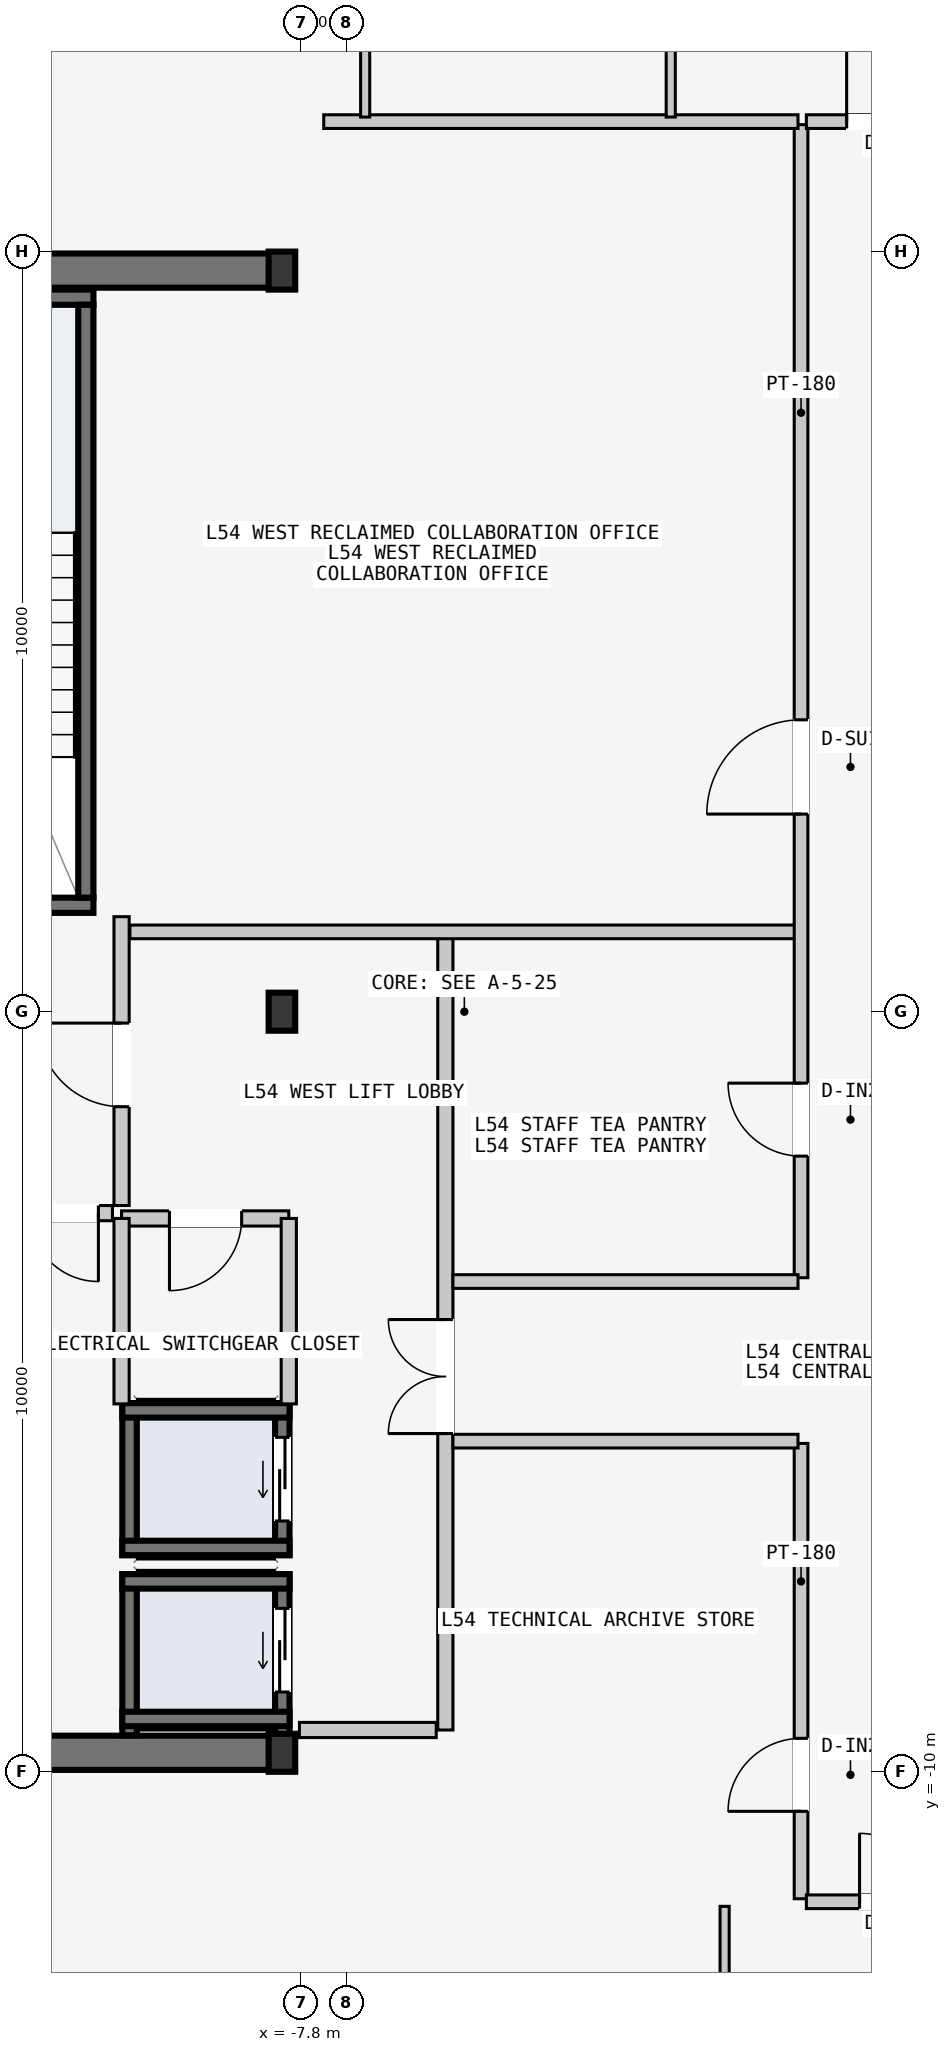
"""IFC4 building model, lengths in metres.
Left out: names, types, materials, properties, quantities, classifications, styles, units other than length and angle.
Written with IfcOpenShell. Run it as: python <this file> out.ifc"""

import sys

from ifc_helpers import new_model, si_unit, direction, frame, frame_2d, origin, origin_2d, place, context, subcontext, project, spatial, rectangle, i_section, extrude, element, fill, save


model = new_model("IFC4")
c1 = context("Model", 3, precision=1e-05, world=origin(), true_north=direction((0.0, 1.0)))
c2 = subcontext(c1, "Body", "Model", "MODEL_VIEW")
j1 = project(units=[si_unit("LENGTHUNIT", "METRE"), si_unit("PLANEANGLEUNIT", "RADIAN")], contexts=[c1])
p1 = place(None, origin())
s1 = spatial("IfcSite", under=j1, at=p1, CompositionType="ELEMENT")
p2 = place(p1, origin())
s2 = spatial("IfcBuilding", under=s1, at=p2, CompositionType="ELEMENT")
p3 = place(p2, frame((0.0, 0.0, 205.5)))
s3 = spatial("IfcBuildingStorey", under=s2, at=p3, CompositionType="ELEMENT", Elevation=205.5)
for number, where, z_axis, x_axis in (
    (1, (-14.53, -9.75, -0.2), (0.0, 0.0, 1.0), (1.0, 0.0, 0.0)),
    (2, (-14.53, 9.75, -0.2), (0.0, 0.0, 1.0), (1.0, 0.0, 0.0)),
):
    element("IfcWall", number, at=place(p3, frame(where, z_axis=z_axis, x_axis=x_axis)), inside=s3, PredefinedType="SHEAR", context=c2, shape_type="SweptSolid", body=[
        extrude(rectangle(XDim=6.46, YDim=0.45, at=frame_2d((3.23, 0.0))), origin(), (0.0, 0.0, 1.0), 3.6),
    ])
p4 = place(p3, frame((-14.25, 1.4, -0.2), z_axis=(0.0, 0.0, 1.0), x_axis=(1.0, 0.0, 0.0)))
e3 = element("IfcWall", 3, at=p4, inside=s3, PredefinedType="SOLIDWALL", context=c2, shape_type="SweptSolid", body=[
    extrude(rectangle(XDim=3.72, YDim=0.2, at=frame_2d((1.86, 0.0))), origin(), (0.0, 0.0, 1.0), 3.6),
])
p5 = place(p4, frame((1.5, 0.0, 0.2)))
e4 = element("IfcOpeningElement", 4, at=p5, cuts=e3, PredefinedType="OPENING", context=c2, shape_type="SweptSolid", body=[
    extrude(rectangle(XDim=1.12, YDim=2.18, at=frame_2d((0.56, 1.09))), frame((0.0, 0.11, 0.0), z_axis=(0.0, -1.0, 0.0), x_axis=(1.0, 0.0, 0.0)), (0.0, 0.0, 1.0), 0.22),
])
p6 = place(p3, frame((-14.25, 9.4, -0.2), z_axis=(0.0, 0.0, 1.0), x_axis=(1.0, 0.0, 0.0)))
e5 = element("IfcWall", 5, at=p6, inside=s3, PredefinedType="SOLIDWALL", context=c2, shape_type="SweptSolid", body=[
    extrude(rectangle(XDim=3.72, YDim=0.2, at=frame_2d((1.86, 0.0))), origin(), (0.0, 0.0, 1.0), 3.6),
])
p7 = place(p3, frame((-10.63, 1.5, -0.2), z_axis=(0.0, 0.0, 1.0), x_axis=(0.0, 1.0, 0.0)))
e6 = element("IfcWall", 6, at=p7, inside=s3, PredefinedType="SOLIDWALL", context=c2, shape_type="SweptSolid", body=[
    extrude(rectangle(XDim=7.8, YDim=0.2, at=frame_2d((3.9, 0.0))), origin(), (0.0, 0.0, 1.0), 3.6),
])
for number, where, z_axis, x_axis in (
    (7, (-8.05, -9.75, 0.0), (0.0, 0.0, 1.0), (1.0, 0.0, 0.0)),
    (8, (-8.05, 0.0, 0.0), (0.0, 0.0, 1.0), (1.0, 0.0, 0.0)),
    (9, (-8.05, 9.75, 0.0), (0.0, 0.0, 1.0), (1.0, 0.0, 0.0)),
):
    element("IfcColumn", number, at=place(p3, frame(where, z_axis=z_axis, x_axis=x_axis)), inside=s3, PredefinedType="COLUMN", context=c2, shape_type="SweptSolid", body=[
        extrude(i_section(OverallWidth=0.35, OverallDepth=0.5, WebThickness=0.02, FlangeThickness=0.032, at=origin_2d()), origin(), (0.0, 0.0, 1.0), 3.6),
    ])
p8 = place(p3, frame((-8.045, -9.52, -0.2), z_axis=(0.0, 0.0, 1.0), x_axis=(0.0, 1.0, 0.0)))
e10 = element("IfcWall", 10, at=p8, inside=s3, PredefinedType="SOLIDWALL", context=c2, shape_type="SweptSolid", body=[
    extrude(rectangle(XDim=2.12, YDim=0.19, at=frame_2d((1.06, 0.0))), origin(), (0.0, 0.0, 1.0), 3.6),
])
p9 = place(p8, frame((0.57, 0.0, 0.2)))
e11 = element("IfcOpeningElement", 11, at=p9, cuts=e10, PredefinedType="OPENING", context=c2, shape_type="SweptSolid", body=[
    extrude(rectangle(XDim=1.1, YDim=2.2, at=frame_2d((0.55, 1.1))), frame((0.0, 0.105, 0.0), z_axis=(0.0, -1.0, 0.0), x_axis=(1.0, 0.0, 0.0)), (0.0, 0.0, 1.0), 0.21),
])
p10 = place(p3, frame((-10.055, -9.52, -0.2), z_axis=(0.0, 0.0, 1.0), x_axis=(0.0, 1.0, 0.0)))
e12 = element("IfcWall", 12, at=p10, inside=s3, PredefinedType="SOLIDWALL", context=c2, shape_type="SweptSolid", body=[
    extrude(rectangle(XDim=2.12, YDim=0.19, at=frame_2d((1.06, 0.0))), origin(), (0.0, 0.0, 1.0), 3.6),
])
for number, where, z_axis, x_axis in (
    (13, (-10.15, -7.495, -0.2), (0.0, 0.0, 1.0), (1.0, 0.0, 0.0)),
    (14, (-10.15, -9.305, -0.2), (0.0, 0.0, 1.0), (1.0, 0.0, 0.0)),
):
    element("IfcWall", number, at=place(p3, frame(where, z_axis=z_axis, x_axis=x_axis)), inside=s3, PredefinedType="SOLIDWALL", context=c2, shape_type="SweptSolid", body=[
        extrude(rectangle(XDim=2.2, YDim=0.19, at=frame_2d((1.1, 0.0))), origin(), (0.0, 0.0, 1.0), 3.6),
    ])
p11 = place(p3, frame((-8.045, -7.15, -0.2), z_axis=(0.0, 0.0, 1.0), x_axis=(0.0, 1.0, 0.0)))
e15 = element("IfcWall", 15, at=p11, inside=s3, PredefinedType="SOLIDWALL", context=c2, shape_type="SweptSolid", body=[
    extrude(rectangle(XDim=2.0, YDim=0.19, at=frame_2d((1.0, 0.0))), origin(), (0.0, 0.0, 1.0), 3.6),
])
p12 = place(p11, frame((0.45, 0.0, 0.2)))
e16 = element("IfcOpeningElement", 16, at=p12, cuts=e15, PredefinedType="OPENING", context=c2, shape_type="SweptSolid", body=[
    extrude(rectangle(XDim=1.1, YDim=2.2, at=frame_2d((0.55, 1.1))), frame((0.0, 0.105, 0.0), z_axis=(0.0, -1.0, 0.0), x_axis=(1.0, 0.0, 0.0)), (0.0, 0.0, 1.0), 0.21),
])
p13 = place(p3, frame((-10.055, -7.15, -0.2), z_axis=(0.0, 0.0, 1.0), x_axis=(0.0, 1.0, 0.0)))
e17 = element("IfcWall", 17, at=p13, inside=s3, PredefinedType="SOLIDWALL", context=c2, shape_type="SweptSolid", body=[
    extrude(rectangle(XDim=2.0, YDim=0.19, at=frame_2d((1.0, 0.0))), origin(), (0.0, 0.0, 1.0), 3.6),
])
for number, where, z_axis, x_axis in (
    (18, (-10.15, -5.245, -0.2), (0.0, 0.0, 1.0), (1.0, 0.0, 0.0)),
    (19, (-10.15, -7.055, -0.2), (0.0, 0.0, 1.0), (1.0, 0.0, 0.0)),
):
    element("IfcWall", number, at=place(p3, frame(where, z_axis=z_axis, x_axis=x_axis)), inside=s3, PredefinedType="SOLIDWALL", context=c2, shape_type="SweptSolid", body=[
        extrude(rectangle(XDim=2.2, YDim=0.19, at=frame_2d((1.1, 0.0))), origin(), (0.0, 0.0, 1.0), 3.6),
    ])
p14 = place(p3, frame((-5.9, -9.45, 0.0), z_axis=(0.0, 0.0, 1.0), x_axis=(0.0, 1.0, 0.0)))
e20 = element("IfcWall", 20, at=p14, inside=s3, PredefinedType="PARTITIONING", context=c2, shape_type="SweptSolid", body=[
    extrude(rectangle(XDim=10.5, YDim=0.2, at=frame_2d((5.25, 0.0))), origin(), (0.0, 0.0, 1.0), 3.4),
])
p15 = place(p14, frame((3.9, 0.0, 0.0)))
e21 = element("IfcOpeningElement", 21, at=p15, cuts=e20, PredefinedType="OPENING", context=c2, shape_type="SweptSolid", body=[
    extrude(rectangle(XDim=1.5, YDim=2.2, at=frame_2d((0.75, 1.1))), frame((0.0, 0.11, 0.0), z_axis=(0.0, -1.0, 0.0), x_axis=(1.0, 0.0, 0.0)), (0.0, 0.0, 1.0), 0.22),
])
p16 = place(p3, frame((-6.02, -9.45, 0.0), z_axis=(0.0, 0.0, 1.0), x_axis=(-1.0, 0.0, 0.0)))
e22 = element("IfcWall", 22, at=p16, inside=s3, PredefinedType="PARTITIONING", context=c2, shape_type="SweptSolid", body=[
    extrude(rectangle(XDim=1.8, YDim=0.2, at=frame_2d((0.9, 0.0))), origin(), (0.0, 0.0, 1.0), 3.4),
])
p17 = place(p3, frame((-10.16, -2.55, 0.0), z_axis=(0.0, 0.0, 1.0), x_axis=(0.0, 1.0, 0.0)))
e23 = element("IfcWall", 23, at=p17, inside=s3, PredefinedType="PARTITIONING", context=c2, shape_type="SweptSolid", body=[
    extrude(rectangle(XDim=3.8, YDim=0.2, at=frame_2d((1.9, 0.0))), origin(), (0.0, 0.0, 1.0), 3.4),
])
p18 = place(p17, frame((1.3, 0.0, 0.0)))
e24 = element("IfcOpeningElement", 24, at=p18, cuts=e23, PredefinedType="OPENING", context=c2, shape_type="SweptSolid", body=[
    extrude(rectangle(XDim=1.1, YDim=2.15, at=frame_2d((0.55, 1.075))), frame((0.0, 0.11, 0.0), z_axis=(0.0, -1.0, 0.0), x_axis=(1.0, 0.0, 0.0)), (0.0, 0.0, 1.0), 0.22),
])
p19 = place(p3, frame((-10.28, -2.65, 0.0), z_axis=(0.0, 0.0, 1.0), x_axis=(-1.0, 0.0, 0.0)))
e25 = element("IfcWall", 25, at=p19, inside=s3, PredefinedType="PARTITIONING", context=c2, shape_type="SweptSolid", body=[
    extrude(rectangle(XDim=1.27, YDim=0.2, at=frame_2d((0.635, 0.0))), origin(), (0.0, 0.0, 1.0), 3.4),
])
p20 = place(p19, frame((0.185, 0.0, 0.0)))
e26 = element("IfcOpeningElement", 26, at=p20, cuts=e25, PredefinedType="OPENING", context=c2, shape_type="SweptSolid", body=[
    extrude(rectangle(XDim=0.9, YDim=2.15, at=frame_2d((0.45, 1.075))), frame((0.0, 0.11, 0.0), z_axis=(0.0, -1.0, 0.0), x_axis=(1.0, 0.0, 0.0)), (0.0, 0.0, 1.0), 0.22),
])
p21 = place(p3, frame((-7.96, -2.72, 0.0), z_axis=(0.0, 0.0, 1.0), x_axis=(-1.0, 0.0, 0.0)))
e27 = element("IfcWall", 27, at=p21, inside=s3, PredefinedType="PARTITIONING", context=c2, shape_type="SweptSolid", body=[
    extrude(rectangle(XDim=2.2, YDim=0.2, at=frame_2d((1.1, 0.0))), origin(), (0.0, 0.0, 1.0), 3.4),
])
p22 = place(p21, frame((0.62, 0.0, 0.0)))
e28 = element("IfcOpeningElement", 28, at=p22, cuts=e27, PredefinedType="OPENING", context=c2, shape_type="SweptSolid", body=[
    extrude(rectangle(XDim=0.95, YDim=2.1, at=frame_2d((0.475, 1.05))), frame((0.0, 0.11, 0.0), z_axis=(0.0, -1.0, 0.0), x_axis=(1.0, 0.0, 0.0)), (0.0, 0.0, 1.0), 0.22),
])
for number, where, z_axis, x_axis in (
    (29, (-7.96, -5.16, 0.0), (0.0, 0.0, 1.0), (0.0, 1.0, 0.0)),
    (30, (-10.16, -5.16, 0.0), (0.0, 0.0, 1.0), (0.0, 1.0, 0.0)),
):
    element("IfcWall", number, at=place(p3, frame(where, z_axis=z_axis, x_axis=x_axis)), inside=s3, PredefinedType="PARTITIONING", context=c2, shape_type="SweptSolid", body=[
        extrude(rectangle(XDim=2.44, YDim=0.2, at=frame_2d((1.22, 0.0))), origin(), (0.0, 0.0, 1.0), 3.4),
    ])
p23 = place(p3, frame((-10.05, 1.05, 0.0), z_axis=(0.0, 0.0, 1.0), x_axis=(1.0, 0.0, 0.0)))
e31 = element("IfcWall", 31, at=p23, inside=s3, PredefinedType="PARTITIONING", context=c2, shape_type="SweptSolid", body=[
    extrude(rectangle(XDim=8.79, YDim=0.18, at=frame_2d((4.395, 0.0))), origin(), (0.0, 0.0, 1.0), 3.4),
])
p24 = place(p3, frame((-1.22, -3.5, 0.0), z_axis=(0.0, 0.0, 1.0), x_axis=(0.0, 1.0, 0.0)))
e32 = element("IfcWall", 32, at=p24, inside=s3, PredefinedType="PARTITIONING", context=c2, shape_type="SweptSolid", body=[
    extrude(rectangle(XDim=15.17, YDim=0.18, at=frame_2d((7.585, 0.0))), origin(), (0.0, 0.0, 1.0), 3.4),
])
p25 = place(p24, frame((6.1, 0.0, 0.0)))
e33 = element("IfcOpeningElement", 33, at=p25, cuts=e32, PredefinedType="OPENING", context=c2, shape_type="SweptSolid", body=[
    extrude(rectangle(XDim=1.24, YDim=2.24, at=frame_2d((0.62, 1.12))), frame((0.0, 0.1, 0.0), z_axis=(0.0, -1.0, 0.0), x_axis=(1.0, 0.0, 0.0)), (0.0, 0.0, 1.0), 0.2),
])
p26 = place(p24, frame((1.6, 0.0, 0.0)))
e34 = element("IfcOpeningElement", 34, at=p26, cuts=e32, PredefinedType="OPENING", context=c2, shape_type="SweptSolid", body=[
    extrude(rectangle(XDim=0.96, YDim=2.18, at=frame_2d((0.48, 1.09))), frame((0.0, 0.1, 0.0), z_axis=(0.0, -1.0, 0.0), x_axis=(1.0, 0.0, 0.0)), (0.0, 0.0, 1.0), 0.2),
])
p27 = place(p3, frame((-7.5, 11.71, 0.0), z_axis=(0.0, 0.0, 1.0), x_axis=(1.0, 0.0, 0.0)))
e35 = element("IfcWall", 35, at=p27, inside=s3, PredefinedType="PARTITIONING", context=c2, shape_type="SweptSolid", body=[
    extrude(rectangle(XDim=6.24, YDim=0.18, at=frame_2d((3.12, 0.0))), origin(), (0.0, 0.0, 1.0), 3.4),
])
p28 = place(p3, frame((-5.8, -3.55, 0.0), z_axis=(0.0, 0.0, 1.0), x_axis=(1.0, 0.0, 0.0)))
e36 = element("IfcWall", 36, at=p28, inside=s3, PredefinedType="PARTITIONING", context=c2, shape_type="SweptSolid", body=[
    extrude(rectangle(XDim=4.54, YDim=0.18, at=frame_2d((2.27, 0.0))), origin(), (0.0, 0.0, 1.0), 3.4),
])
p29 = place(p3, frame((-1.22, -11.67, 0.0), z_axis=(0.0, 0.0, 1.0), x_axis=(0.0, 1.0, 0.0)))
e37 = element("IfcWall", 37, at=p29, inside=s3, PredefinedType="PARTITIONING", context=c2, shape_type="SweptSolid", body=[
    extrude(rectangle(XDim=5.99, YDim=0.18, at=frame_2d((2.995, 0.0))), origin(), (0.0, 0.0, 1.0), 3.4),
])
p30 = place(p29, frame((1.15, 0.0, 0.0)))
e38 = element("IfcOpeningElement", 38, at=p30, cuts=e37, PredefinedType="OPENING", context=c2, shape_type="SweptSolid", body=[
    extrude(rectangle(XDim=0.96, YDim=2.18, at=frame_2d((0.48, 1.09))), frame((0.0, 0.1, 0.0), z_axis=(0.0, -1.0, 0.0), x_axis=(1.0, 0.0, 0.0)), (0.0, 0.0, 1.0), 0.2),
])
p31 = place(p3, frame((-5.8, -5.65, 0.0), z_axis=(0.0, 0.0, 1.0), x_axis=(1.0, 0.0, 0.0)))
e39 = element("IfcWall", 39, at=p31, inside=s3, PredefinedType="PARTITIONING", context=c2, shape_type="SweptSolid", body=[
    extrude(rectangle(XDim=4.54, YDim=0.18, at=frame_2d((2.27, 0.0))), origin(), (0.0, 0.0, 1.0), 3.4),
])
p32 = place(p3, frame((-6.955, 11.77, 0.0), z_axis=(0.0, 0.0, 1.0), x_axis=(0.0, 1.0, 0.0)))
e40 = element("IfcWall", 40, at=p32, inside=s3, PredefinedType="PARTITIONING", context=c2, shape_type="SweptSolid", body=[
    extrude(rectangle(XDim=6.79, YDim=0.12, at=frame_2d((3.395, 0.0))), origin(), (0.0, 0.0, 1.0), 3.4),
])
p33 = place(p32, frame((1.15, 0.0, 0.0)))
e41 = element("IfcOpeningElement", 41, at=p33, cuts=e40, PredefinedType="OPENING", context=c2, shape_type="SweptSolid", body=[
    extrude(rectangle(XDim=0.96, YDim=2.18, at=frame_2d((0.48, 1.09))), frame((0.0, 0.07, 0.0), z_axis=(0.0, -1.0, 0.0), x_axis=(1.0, 0.0, 0.0)), (0.0, 0.0, 1.0), 0.14),
])
p34 = place(p3, frame((-2.935, 11.77, 0.0), z_axis=(0.0, 0.0, 1.0), x_axis=(0.0, 1.0, 0.0)))
e42 = element("IfcWall", 42, at=p34, inside=s3, PredefinedType="PARTITIONING", context=c2, shape_type="SweptSolid", body=[
    extrude(rectangle(XDim=6.79, YDim=0.12, at=frame_2d((3.395, 0.0))), origin(), (0.0, 0.0, 1.0), 3.4),
])
p35 = place(p34, frame((1.15, 0.0, 0.0)))
e43 = element("IfcOpeningElement", 43, at=p35, cuts=e42, PredefinedType="OPENING", context=c2, shape_type="SweptSolid", body=[
    extrude(rectangle(XDim=0.96, YDim=2.18, at=frame_2d((0.48, 1.09))), frame((0.0, 0.07, 0.0), z_axis=(0.0, -1.0, 0.0), x_axis=(1.0, 0.0, 0.0)), (0.0, 0.0, 1.0), 0.14),
])
p36 = place(p3, frame((-1.15, 11.71, 0.0), z_axis=(0.0, 0.0, 1.0), x_axis=(1.0, 0.0, 0.0)))
e44 = element("IfcWall", 44, at=p36, inside=s3, PredefinedType="PARTITIONING", context=c2, shape_type="SweptSolid", body=[
    extrude(rectangle(XDim=2.3, YDim=0.18, at=frame_2d((1.15, 0.0))), origin(), (0.0, 0.0, 1.0), 3.4),
])
p37 = place(p36, frame((0.53, 0.0, 0.0)))
e45 = element("IfcOpeningElement", 45, at=p37, cuts=e44, PredefinedType="OPENING", context=c2, shape_type="SweptSolid", body=[
    extrude(rectangle(XDim=1.24, YDim=2.24, at=frame_2d((0.62, 1.12))), frame((0.0, 0.1, 0.0), z_axis=(0.0, -1.0, 0.0), x_axis=(1.0, 0.0, 0.0)), (0.0, 0.0, 1.0), 0.2),
])
p38 = place(p3, frame((-2.226, -18.56, 0.0), z_axis=(0.0, 0.0, 1.0), x_axis=(0.0, 1.0, 0.0)))
e46 = element("IfcWall", 46, at=p38, inside=s3, PredefinedType="PARTITIONING", context=c2, shape_type="SweptSolid", body=[
    extrude(rectangle(XDim=6.79, YDim=0.12, at=frame_2d((3.395, 0.0))), origin(), (0.0, 0.0, 1.0), 3.4),
])
p39 = place(p38, frame((1.05, 0.0, 0.0)))
e47 = element("IfcOpeningElement", 47, at=p39, cuts=e46, PredefinedType="OPENING", context=c2, shape_type="SweptSolid", body=[
    extrude(rectangle(XDim=0.96, YDim=2.18, at=frame_2d((0.48, 1.09))), frame((0.0, 0.07, 0.0), z_axis=(0.0, -1.0, 0.0), x_axis=(1.0, 0.0, 0.0)), (0.0, 0.0, 1.0), 0.14),
])
p40 = place(p3, frame((-1.15, -11.71, 0.0), z_axis=(0.0, 0.0, 1.0), x_axis=(1.0, 0.0, 0.0)))
e48 = element("IfcWall", 48, at=p40, inside=s3, PredefinedType="PARTITIONING", context=c2, shape_type="SweptSolid", body=[
    extrude(rectangle(XDim=2.3, YDim=0.18, at=frame_2d((1.15, 0.0))), origin(), (0.0, 0.0, 1.0), 3.4),
])
p41 = place(p40, frame((0.7, 0.0, 0.0)))
e49 = element("IfcOpeningElement", 49, at=p41, cuts=e48, PredefinedType="OPENING", context=c2, shape_type="SweptSolid", body=[
    extrude(rectangle(XDim=0.9, YDim=2.15, at=frame_2d((0.45, 1.075))), frame((0.0, 0.1, 0.0), z_axis=(0.0, -1.0, 0.0), x_axis=(1.0, 0.0, 0.0)), (0.0, 0.0, 1.0), 0.2),
])
p42 = place(p9, origin())
e50 = element("IfcDoor", 50, at=p42, inside=s3, OperationType="SLIDING_TO_LEFT", PredefinedType="DOOR", context=c2, shape_type="SweptSolid", body=[
    extrude(rectangle(XDim=1.1, YDim=2.2, at=frame_2d((0.55, 1.1))), frame((0.0, 0.025, 0.0), z_axis=(0.0, -1.0, 0.0), x_axis=(1.0, 0.0, 0.0)), (0.0, 0.0, 1.0), 0.05),
])
fill(e11, e50)
p43 = place(p12, origin())
e51 = element("IfcDoor", 51, at=p43, inside=s3, OperationType="SLIDING_TO_LEFT", PredefinedType="DOOR", context=c2, shape_type="SweptSolid", body=[
    extrude(rectangle(XDim=1.1, YDim=2.2, at=frame_2d((0.55, 1.1))), frame((0.0, 0.025, 0.0), z_axis=(0.0, -1.0, 0.0), x_axis=(1.0, 0.0, 0.0)), (0.0, 0.0, 1.0), 0.05),
])
fill(e16, e51)
p44 = place(p15, origin())
e52 = element("IfcDoor", 52, at=p44, inside=s3, OperationType="DOUBLE_DOOR_SINGLE_SWING", PredefinedType="DOOR", context=c2, shape_type="SweptSolid", body=[
    extrude(rectangle(XDim=1.5, YDim=2.2, at=frame_2d((0.75, 1.1))), frame((0.0, 0.025, 0.0), z_axis=(0.0, -1.0, 0.0), x_axis=(1.0, 0.0, 0.0)), (0.0, 0.0, 1.0), 0.05),
])
fill(e21, e52)
p45 = place(p18, origin())
e53 = element("IfcDoor", 53, at=p45, inside=s3, OperationType="SINGLE_SWING_RIGHT", PredefinedType="DOOR", context=c2, shape_type="SweptSolid", body=[
    extrude(rectangle(XDim=1.1, YDim=2.15, at=frame_2d((0.55, 1.075))), frame((0.0, 0.025, 0.0), z_axis=(0.0, -1.0, 0.0), x_axis=(1.0, 0.0, 0.0)), (0.0, 0.0, 1.0), 0.05),
])
fill(e24, e53)
p46 = place(p20, origin())
e54 = element("IfcDoor", 54, at=p46, inside=s3, OperationType="SINGLE_SWING_LEFT", PredefinedType="DOOR", context=c2, shape_type="SweptSolid", body=[
    extrude(rectangle(XDim=0.9, YDim=2.15, at=frame_2d((0.45, 1.075))), frame((0.0, 0.025, 0.0), z_axis=(0.0, -1.0, 0.0), x_axis=(1.0, 0.0, 0.0)), (0.0, 0.0, 1.0), 0.05),
])
fill(e26, e54)
p47 = place(p22, origin())
e55 = element("IfcDoor", 55, at=p47, inside=s3, OperationType="SINGLE_SWING_RIGHT", PredefinedType="DOOR", context=c2, shape_type="SweptSolid", body=[
    extrude(rectangle(XDim=0.95, YDim=2.1, at=frame_2d((0.475, 1.05))), frame((0.0, 0.025, 0.0), z_axis=(0.0, -1.0, 0.0), x_axis=(1.0, 0.0, 0.0)), (0.0, 0.0, 1.0), 0.05),
])
fill(e28, e55)
p48 = place(p25, origin())
e56 = element("IfcDoor", 56, at=p48, inside=s3, OperationType="SINGLE_SWING_LEFT", PredefinedType="DOOR", context=c2, shape_type="SweptSolid", body=[
    extrude(rectangle(XDim=1.24, YDim=2.24, at=frame_2d((0.62, 1.12))), frame((0.0, 0.025, 0.0), z_axis=(0.0, -1.0, 0.0), x_axis=(1.0, 0.0, 0.0)), (0.0, 0.0, 1.0), 0.05),
])
fill(e33, e56)
p49 = place(p26, origin())
e57 = element("IfcDoor", 57, at=p49, inside=s3, OperationType="SINGLE_SWING_RIGHT", PredefinedType="DOOR", context=c2, shape_type="SweptSolid", body=[
    extrude(rectangle(XDim=0.96, YDim=2.18, at=frame_2d((0.48, 1.09))), frame((0.0, 0.025, 0.0), z_axis=(0.0, -1.0, 0.0), x_axis=(1.0, 0.0, 0.0)), (0.0, 0.0, 1.0), 0.05),
])
fill(e34, e57)
p50 = place(p30, origin())
e58 = element("IfcDoor", 58, at=p50, inside=s3, OperationType="SINGLE_SWING_LEFT", PredefinedType="DOOR", context=c2, shape_type="SweptSolid", body=[
    extrude(rectangle(XDim=0.96, YDim=2.18, at=frame_2d((0.48, 1.09))), frame((0.0, 0.025, 0.0), z_axis=(0.0, -1.0, 0.0), x_axis=(1.0, 0.0, 0.0)), (0.0, 0.0, 1.0), 0.05),
])
fill(e38, e58)
p51 = place(p37, origin())
e59 = element("IfcDoor", 59, at=p51, inside=s3, OperationType="SINGLE_SWING_LEFT", PredefinedType="DOOR", context=c2, shape_type="SweptSolid", body=[
    extrude(rectangle(XDim=1.24, YDim=2.24, at=frame_2d((0.62, 1.12))), frame((0.0, 0.025, 0.0), z_axis=(0.0, -1.0, 0.0), x_axis=(1.0, 0.0, 0.0)), (0.0, 0.0, 1.0), 0.05),
])
fill(e45, e59)
p52 = place(p41, origin())
e60 = element("IfcDoor", 60, at=p52, inside=s3, OperationType="SINGLE_SWING_LEFT", PredefinedType="DOOR", context=c2, shape_type="SweptSolid", body=[
    extrude(rectangle(XDim=0.9, YDim=2.15, at=frame_2d((0.45, 1.075))), frame((0.0, 0.025, 0.0), z_axis=(0.0, -1.0, 0.0), x_axis=(1.0, 0.0, 0.0)), (0.0, 0.0, 1.0), 0.05),
])
fill(e49, e60)
save(model, sys.argv[1])
